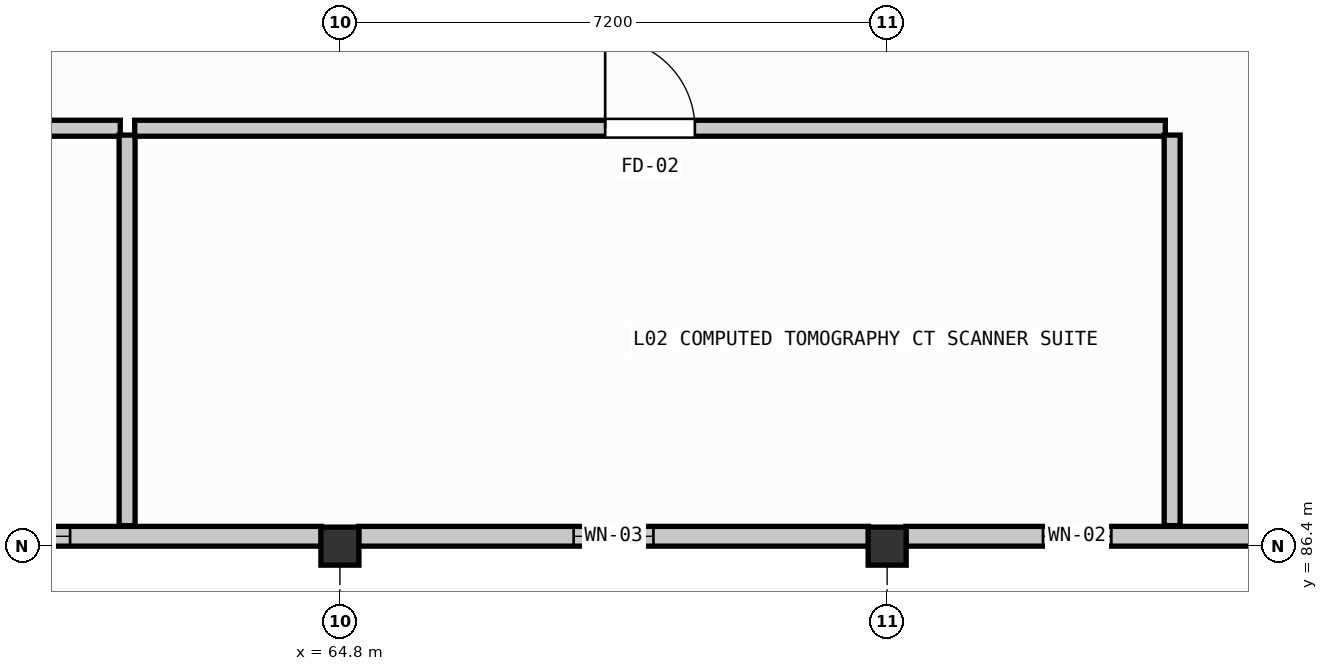
"""IFC4 building model, lengths in metres.
Left out: names, types, materials, properties, quantities, classifications, styles, units other than length and angle.
Written with IfcOpenShell. Run it as: python <this file> out.ifc"""

import sys

from ifc_helpers import new_model, si_unit, direction, frame, frame_2d, origin, origin_2d, place, context, subcontext, project, spatial, rectangle, extrude, element, fill, save


model = new_model("IFC4")
c1 = context("Model", 3, precision=1e-05, world=origin(), true_north=direction((0.0, 1.0)))
c2 = subcontext(c1, "Body", "Model", "MODEL_VIEW")
j1 = project(units=[si_unit("LENGTHUNIT", "METRE"), si_unit("PLANEANGLEUNIT", "RADIAN")], contexts=[c1])
p1 = place(None, origin())
s1 = spatial("IfcSite", under=j1, at=p1, CompositionType="ELEMENT")
p2 = place(p1, origin())
s2 = spatial("IfcBuilding", under=s1, at=p2, CompositionType="ELEMENT")
p3 = place(p2, frame((0.0, 0.0, 4.8)))
s3 = spatial("IfcBuildingStorey", under=s2, at=p3, CompositionType="ELEMENT", Elevation=4.8)
for number, where, z_axis, x_axis in (
    (1, (64.8, 86.4, 0.0), (0.0, 0.0, 1.0), (1.0, 0.0, 0.0)),
    (2, (72.0, 86.4, 0.0), (0.0, 0.0, 1.0), (1.0, 0.0, 0.0)),
):
    element("IfcColumn", number, at=place(p3, frame(where, z_axis=z_axis, x_axis=x_axis)), inside=s3, PredefinedType="COLUMN", context=c2, shape_type="SweptSolid", body=[
        extrude(rectangle(XDim=0.5, YDim=0.5, at=origin_2d()), origin(), (0.0, 0.0, 1.0), 4.2),
    ])
p4 = place(p3, frame((78.955, 86.53, 0.0), z_axis=(0.0, 0.0, 1.0), x_axis=(-1.0, 0.0, 0.0)))
e3 = element("IfcWall", 3, at=p4, inside=s3, PredefinedType="SOLIDWALL", context=c2, shape_type="SweptSolid", body=[
    extrude(rectangle(XDim=6.71, YDim=0.26, at=frame_2d((3.355, 0.0))), origin(), (0.0, 0.0, 1.0), 3.4),
])
p5 = place(p4, frame((4.005, 0.0, 2.1)))
e4 = element("IfcOpeningElement", 4, at=p5, cuts=e3, PredefinedType="OPENING", context=c2, shape_type="SweptSolid", body=[
    extrude(rectangle(XDim=0.9, YDim=0.65, at=frame_2d((0.45, 0.325))), frame((0.0, 0.14, 0.0), z_axis=(0.0, -1.0, 0.0), x_axis=(1.0, 0.0, 0.0)), (0.0, 0.0, 1.0), 0.28),
])
p6 = place(p3, frame((71.755, 86.53, 0.0), z_axis=(0.0, 0.0, 1.0), x_axis=(-1.0, 0.0, 0.0)))
e5 = element("IfcWall", 5, at=p6, inside=s3, PredefinedType="SOLIDWALL", context=c2, shape_type="SweptSolid", body=[
    extrude(rectangle(XDim=6.71, YDim=0.26, at=frame_2d((3.355, 0.0))), origin(), (0.0, 0.0, 1.0), 3.4),
])
p7 = place(p6, frame((2.83, 0.0, 2.1)))
e6 = element("IfcOpeningElement", 6, at=p7, cuts=e5, PredefinedType="OPENING", context=c2, shape_type="SweptSolid", body=[
    extrude(rectangle(XDim=1.05, YDim=0.65, at=frame_2d((0.525, 0.325))), frame((0.0, 0.14, 0.0), z_axis=(0.0, -1.0, 0.0), x_axis=(1.0, 0.0, 0.0)), (0.0, 0.0, 1.0), 0.28),
])
p8 = place(p3, frame((64.555, 86.53, 0.0), z_axis=(0.0, 0.0, 1.0), x_axis=(-1.0, 0.0, 0.0)))
e7 = element("IfcWall", 7, at=p8, inside=s3, PredefinedType="SOLIDWALL", context=c2, shape_type="SweptSolid", body=[
    extrude(rectangle(XDim=6.71, YDim=0.26, at=frame_2d((3.355, 0.0))), origin(), (0.0, 0.0, 1.0), 3.5),
])
p9 = place(p8, frame((3.305, 0.0, 2.1)))
e8 = element("IfcOpeningElement", 8, at=p9, cuts=e7, PredefinedType="OPENING", context=c2, shape_type="SweptSolid", body=[
    extrude(rectangle(XDim=1.2, YDim=0.65, at=frame_2d((0.6, 0.325))), frame((0.0, 0.14, 0.0), z_axis=(0.0, -1.0, 0.0), x_axis=(1.0, 0.0, 0.0)), (0.0, 0.0, 1.0), 0.28),
])
p10 = place(p3, frame((47.092, 91.898, 0.0), z_axis=(0.0, 0.0, 1.0), x_axis=(1.0, 0.0, 0.0)))
e9 = element("IfcWall", 9, at=p10, inside=s3, PredefinedType="SOLIDWALL", context=c2, shape_type="SweptSolid", body=[
    extrude(rectangle(XDim=14.818, YDim=0.21, at=frame_2d((7.409, 0.0))), origin(), (0.0, 0.0, 1.0), 3.5),
])
p11 = place(p10, frame((6.769, 0.0, 0.0)))
e10 = element("IfcOpeningElement", 10, at=p11, cuts=e9, PredefinedType="OPENING", context=c2, shape_type="SweptSolid", body=[
    extrude(rectangle(XDim=1.28, YDim=2.18, at=frame_2d((0.64, 1.09))), frame((0.0, 0.115, 0.0), z_axis=(0.0, -1.0, 0.0), x_axis=(1.0, 0.0, 0.0)), (0.0, 0.0, 1.0), 0.23),
])
p12 = place(p3, frame((62.0, 91.808, 0.0), z_axis=(0.0, 0.0, 1.0), x_axis=(0.0, -1.0, 0.0)))
e11 = element("IfcWall", 11, at=p12, inside=s3, PredefinedType="SOLIDWALL", context=c2, shape_type="SweptSolid", body=[
    extrude(rectangle(XDim=5.138, YDim=0.21, at=frame_2d((2.569, 0.0))), origin(), (0.0, 0.0, 1.0), 4.2),
])
p13 = place(p3, frame((62.1, 91.898, 0.0), z_axis=(0.0, 0.0, 1.0), x_axis=(1.0, 0.0, 0.0)))
e12 = element("IfcWall", 12, at=p13, inside=s3, PredefinedType="SOLIDWALL", context=c2, shape_type="SweptSolid", body=[
    extrude(rectangle(XDim=13.56, YDim=0.21, at=frame_2d((6.78, 0.0))), origin(), (0.0, 0.0, 1.0), 3.5),
])
p14 = place(p13, frame((6.19, 0.0, 0.0)))
e13 = element("IfcOpeningElement", 13, at=p14, cuts=e12, PredefinedType="OPENING", context=c2, shape_type="SweptSolid", body=[
    extrude(rectangle(XDim=1.18, YDim=2.16, at=frame_2d((0.59, 1.08))), frame((0.0, 0.115, 0.0), z_axis=(0.0, -1.0, 0.0), x_axis=(1.0, 0.0, 0.0)), (0.0, 0.0, 1.0), 0.23),
])
p15 = place(p3, frame((75.75, 91.808, 0.0), z_axis=(0.0, 0.0, 1.0), x_axis=(0.0, -1.0, 0.0)))
e14 = element("IfcWall", 14, at=p15, inside=s3, PredefinedType="SOLIDWALL", context=c2, shape_type="SweptSolid", body=[
    extrude(rectangle(XDim=5.138, YDim=0.21, at=frame_2d((2.569, 0.0))), origin(), (0.0, 0.0, 1.0), 3.4),
])
p16 = place(p5, origin())
e15 = element("IfcWindow", 15, at=p16, inside=s3, PartitioningType="SINGLE_PANEL", PredefinedType="WINDOW", context=c2, shape_type="SweptSolid", body=[
    extrude(rectangle(XDim=0.9, YDim=0.65, at=frame_2d((0.45, 0.325))), frame((0.0, 0.03, 0.0), z_axis=(0.0, -1.0, 0.0), x_axis=(1.0, 0.0, 0.0)), (0.0, 0.0, 1.0), 0.06),
])
fill(e4, e15)
p17 = place(p7, origin())
e16 = element("IfcWindow", 16, at=p17, inside=s3, PartitioningType="SINGLE_PANEL", PredefinedType="WINDOW", context=c2, shape_type="SweptSolid", body=[
    extrude(rectangle(XDim=1.05, YDim=0.65, at=frame_2d((0.525, 0.325))), frame((0.0, 0.03, 0.0), z_axis=(0.0, -1.0, 0.0), x_axis=(1.0, 0.0, 0.0)), (0.0, 0.0, 1.0), 0.06),
])
fill(e6, e16)
p18 = place(p9, origin())
e17 = element("IfcWindow", 17, at=p18, inside=s3, PartitioningType="SINGLE_PANEL", PredefinedType="WINDOW", context=c2, shape_type="SweptSolid", body=[
    extrude(rectangle(XDim=1.2, YDim=0.65, at=frame_2d((0.6, 0.325))), frame((0.0, 0.03, 0.0), z_axis=(0.0, -1.0, 0.0), x_axis=(1.0, 0.0, 0.0)), (0.0, 0.0, 1.0), 0.06),
])
fill(e8, e17)
p19 = place(p14, origin())
e18 = element("IfcDoor", 18, at=p19, inside=s3, OperationType="SINGLE_SWING_LEFT", PredefinedType="DOOR", context=c2, shape_type="SweptSolid", body=[
    extrude(rectangle(XDim=1.18, YDim=2.16, at=frame_2d((0.59, 1.08))), frame((0.0, 0.025, 0.0), z_axis=(0.0, -1.0, 0.0), x_axis=(1.0, 0.0, 0.0)), (0.0, 0.0, 1.0), 0.05),
])
fill(e13, e18)
save(model, sys.argv[1])
